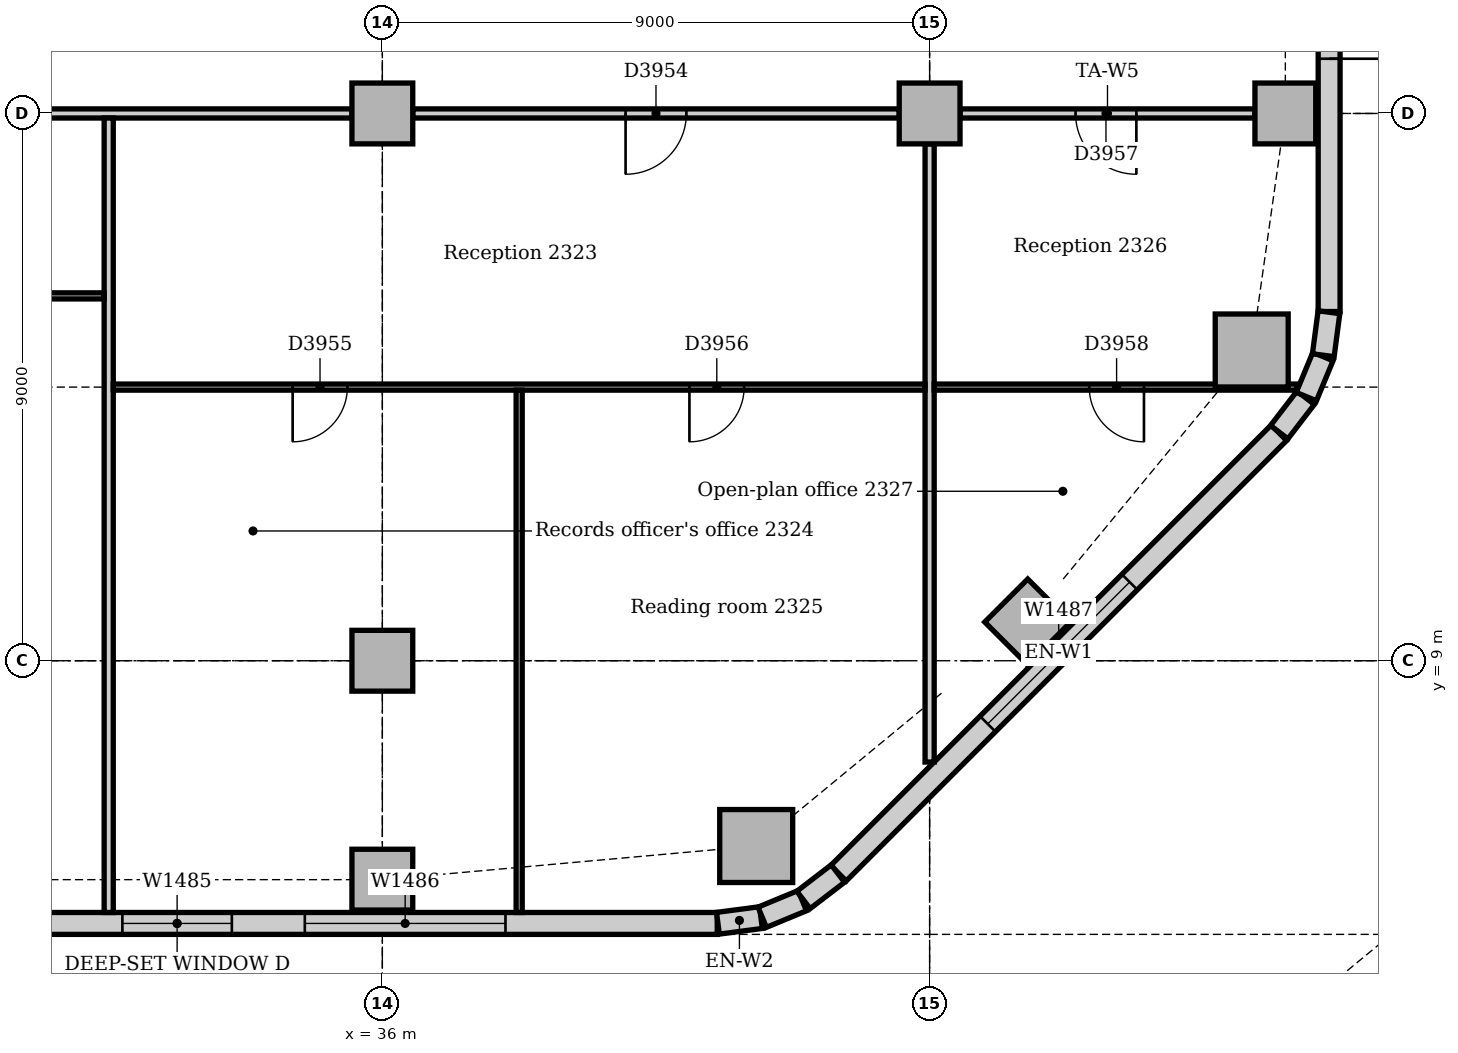
"""IFC4 building model, lengths in metres.
Left out: names, types, materials, properties, quantities, classifications, styles, units other than length and angle.
Written with IfcOpenShell. Run it as: python <this file> out.ifc"""

import sys

from ifc_helpers import new_model, si_unit, direction, frame, frame_2d, origin, origin_2d, place, context, subcontext, project, spatial, rectangle, extrude, element, fill, save


model = new_model("IFC4")
c1 = context("Model", 3, precision=1e-05, world=origin(), true_north=direction((0.0, 1.0)))
c2 = subcontext(c1, "Body", "Model", "MODEL_VIEW")
j1 = project(units=[si_unit("LENGTHUNIT", "METRE"), si_unit("PLANEANGLEUNIT", "RADIAN")], contexts=[c1])
p1 = place(None, origin())
s1 = spatial("IfcSite", under=j1, at=p1, CompositionType="ELEMENT")
p2 = place(p1, origin())
s2 = spatial("IfcBuilding", under=s1, at=p2, CompositionType="ELEMENT")
p3 = place(p2, frame((0.0, 0.0, 100.0)))
s3 = spatial("IfcBuildingStorey", under=s2, at=p3, CompositionType="ELEMENT", Elevation=100.0)
for number, where, z_axis, x_axis in (
    (1, (42.148, 5.953, -0.15), (0.0, 0.0, 1.0), (1.0, 0.0, 0.0)),
    (2, (50.297, 14.102, -0.15), (0.0, 0.0, 1.0), (1.0, 0.0, 0.0)),
):
    element("IfcColumn", number, at=place(p3, frame(where, z_axis=z_axis, x_axis=x_axis)), inside=s3, PredefinedType="COLUMN", context=c2, shape_type="SweptSolid", body=[
        extrude(rectangle(XDim=1.2, YDim=1.2, at=origin_2d()), origin(), (0.0, 0.0, 1.0), 4.0),
    ])
for number, where, z_axis, x_axis in (
    (3, (36.0, 5.4, -0.15), (0.0, 0.0, 1.0), (1.0, 0.0, 0.0)),
    (4, (46.614, 9.636, -0.15), (0.0, 0.0, 1.0), (0.707, 0.707, 0.0)),
    (5, (50.85, 18.0, -0.15), (0.0, 0.0, 1.0), (1.0, 0.0, 0.0)),
):
    element("IfcColumn", number, at=place(p3, frame(where, z_axis=z_axis, x_axis=x_axis)), inside=s3, PredefinedType="COLUMN", context=c2, shape_type="SweptSolid", body=[
        extrude(rectangle(XDim=1.0, YDim=1.0, at=origin_2d()), origin(), (0.0, 0.0, 1.0), 4.0),
    ])
for number, where, z_axis, x_axis in (
    (6, (36.0, 9.0, 0.0), (0.0, 0.0, 1.0), (1.0, 0.0, 0.0)),
    (7, (36.0, 18.0, 0.0), (0.0, 0.0, 1.0), (1.0, 0.0, 0.0)),
    (8, (45.0, 18.0, 0.0), (0.0, 0.0, 1.0), (1.0, 0.0, 0.0)),
):
    element("IfcColumn", number, at=place(p3, frame(where, z_axis=z_axis, x_axis=x_axis)), inside=s3, PredefinedType="COLUMN", context=c2, shape_type="SweptSolid", body=[
        extrude(rectangle(XDim=1.0, YDim=1.0, at=origin_2d()), origin(), (0.0, 0.0, 1.0), 3.85),
    ])
p4 = place(p3, frame((4.243, 4.68, 0.0), z_axis=(0.0, 0.0, 1.0), x_axis=(1.0, 0.0, 0.0)))
e9 = element("IfcWall", 9, at=p4, inside=s3, PredefinedType="STANDARD", context=c2, shape_type="SweptSolid", body=[
    extrude(rectangle(XDim=37.265, YDim=0.36, at=frame_2d((18.632, 0.0))), origin(), (0.0, 0.0, 1.0), 3.85),
])
p5 = place(p4, frame((3.482, 0.0, 0.9)))
e10 = element("IfcOpeningElement", 10, at=p5, cuts=e9, PredefinedType="OPENING", context=c2, shape_type="SweptSolid", body=[
    extrude(rectangle(XDim=3.3, YDim=1.6, at=frame_2d((1.65, 0.8))), frame((0.0, 0.19, 0.0), z_axis=(0.0, -1.0, 0.0), x_axis=(1.0, 0.0, 0.0)), (0.0, 0.0, 1.0), 0.38),
])
p6 = place(p4, frame((8.732, 0.0, 0.0)))
e11 = element("IfcOpeningElement", 11, at=p6, cuts=e9, PredefinedType="OPENING", context=c2, shape_type="SweptSolid", body=[
    extrude(rectangle(XDim=1.8, YDim=2.4, at=frame_2d((0.9, 1.2))), frame((0.0, 0.19, 0.0), z_axis=(0.0, -1.0, 0.0), x_axis=(1.0, 0.0, 0.0)), (0.0, 0.0, 1.0), 0.38),
])
p7 = place(p4, frame((12.482, 0.0, 0.9)))
e12 = element("IfcOpeningElement", 12, at=p7, cuts=e9, PredefinedType="OPENING", context=c2, shape_type="SweptSolid", body=[
    extrude(rectangle(XDim=3.3, YDim=1.6, at=frame_2d((1.65, 0.8))), frame((0.0, 0.19, 0.0), z_axis=(0.0, -1.0, 0.0), x_axis=(1.0, 0.0, 0.0)), (0.0, 0.0, 1.0), 0.38),
])
p8 = place(p4, frame((16.982, 0.0, 0.9)))
e13 = element("IfcOpeningElement", 13, at=p8, cuts=e9, PredefinedType="OPENING", context=c2, shape_type="SweptSolid", body=[
    extrude(rectangle(XDim=3.3, YDim=1.6, at=frame_2d((1.65, 0.8))), frame((0.0, 0.19, 0.0), z_axis=(0.0, -1.0, 0.0), x_axis=(1.0, 0.0, 0.0)), (0.0, 0.0, 1.0), 0.38),
])
p9 = place(p4, frame((21.482, 0.0, 0.9)))
e14 = element("IfcOpeningElement", 14, at=p9, cuts=e9, PredefinedType="OPENING", context=c2, shape_type="SweptSolid", body=[
    extrude(rectangle(XDim=3.3, YDim=1.6, at=frame_2d((1.65, 0.8))), frame((0.0, 0.19, 0.0), z_axis=(0.0, -1.0, 0.0), x_axis=(1.0, 0.0, 0.0)), (0.0, 0.0, 1.0), 0.38),
])
p10 = place(p4, frame((27.482, 0.0, 0.9)))
e15 = element("IfcOpeningElement", 15, at=p10, cuts=e9, PredefinedType="OPENING", context=c2, shape_type="SweptSolid", body=[
    extrude(rectangle(XDim=1.8, YDim=1.6, at=frame_2d((0.9, 0.8))), frame((0.0, 0.19, 0.0), z_axis=(0.0, -1.0, 0.0), x_axis=(1.0, 0.0, 0.0)), (0.0, 0.0, 1.0), 0.38),
])
p11 = place(p4, frame((30.482, 0.0, 0.9)))
e16 = element("IfcOpeningElement", 16, at=p11, cuts=e9, PredefinedType="OPENING", context=c2, shape_type="SweptSolid", body=[
    extrude(rectangle(XDim=3.3, YDim=1.6, at=frame_2d((1.65, 0.8))), frame((0.0, 0.19, 0.0), z_axis=(0.0, -1.0, 0.0), x_axis=(1.0, 0.0, 0.0)), (0.0, 0.0, 1.0), 0.38),
])
p12 = place(p3, frame((43.501, 5.506, 0.0), z_axis=(0.0, 0.0, 1.0), x_axis=(0.707106781187, 0.707106781187, 0.0)))
e17 = element("IfcWall", 17, at=p12, inside=s3, PredefinedType="STANDARD", context=c2, shape_type="SweptSolid", body=[
    extrude(rectangle(XDim=10.243, YDim=0.36, at=frame_2d((5.121, 0.0))), origin(), (0.0, 0.0, 1.0), 3.85),
])
p13 = place(p12, frame((3.471, 0.0, 0.9)))
e18 = element("IfcOpeningElement", 18, at=p13, cuts=e17, PredefinedType="OPENING", context=c2, shape_type="SweptSolid", body=[
    extrude(rectangle(XDim=3.3, YDim=1.6, at=frame_2d((1.65, 0.8))), frame((0.0, 0.19, 0.0), z_axis=(0.0, -1.0, 0.0), x_axis=(1.0, 0.0, 0.0)), (0.0, 0.0, 1.0), 0.38),
])
p14 = place(p3, frame((51.57, 14.743, 0.0), z_axis=(0.0, 0.0, 1.0), x_axis=(0.0, 1.0, 0.0)))
e19 = element("IfcWall", 19, at=p14, inside=s3, PredefinedType="STANDARD", context=c2, shape_type="SweptSolid", body=[
    extrude(rectangle(XDim=24.515, YDim=0.36, at=frame_2d((12.257, 0.0))), origin(), (0.0, 0.0, 1.0), 3.85),
])
p15 = place(p14, frame((4.157, 0.0, 0.0)))
e20 = element("IfcOpeningElement", 20, at=p15, cuts=e19, PredefinedType="OPENING", context=c2, shape_type="SweptSolid", body=[
    extrude(rectangle(XDim=1.8, YDim=2.4, at=frame_2d((0.9, 1.2))), frame((0.0, 0.19, 0.0), z_axis=(0.0, -1.0, 0.0), x_axis=(1.0, 0.0, 0.0)), (0.0, 0.0, 1.0), 0.38),
])
p16 = place(p14, frame((8.357, 0.0, 0.9)))
e21 = element("IfcOpeningElement", 21, at=p16, cuts=e19, PredefinedType="OPENING", context=c2, shape_type="SweptSolid", body=[
    extrude(rectangle(XDim=3.3, YDim=1.6, at=frame_2d((1.65, 0.8))), frame((0.0, 0.19, 0.0), z_axis=(0.0, -1.0, 0.0), x_axis=(1.0, 0.0, 0.0)), (0.0, 0.0, 1.0), 0.38),
])
p17 = place(p14, frame((12.857, 0.0, 0.9)))
e22 = element("IfcOpeningElement", 22, at=p17, cuts=e19, PredefinedType="OPENING", context=c2, shape_type="SweptSolid", body=[
    extrude(rectangle(XDim=3.3, YDim=1.6, at=frame_2d((1.65, 0.8))), frame((0.0, 0.19, 0.0), z_axis=(0.0, -1.0, 0.0), x_axis=(1.0, 0.0, 0.0)), (0.0, 0.0, 1.0), 0.38),
])
p18 = place(p14, frame((17.357, 0.0, 0.9)))
e23 = element("IfcOpeningElement", 23, at=p18, cuts=e19, PredefinedType="OPENING", context=c2, shape_type="SweptSolid", body=[
    extrude(rectangle(XDim=3.3, YDim=1.6, at=frame_2d((1.65, 0.8))), frame((0.0, 0.19, 0.0), z_axis=(0.0, -1.0, 0.0), x_axis=(1.0, 0.0, 0.0)), (0.0, 0.0, 1.0), 0.38),
])
for number, where, z_axis, x_axis in (
    (24, (41.519, 4.683, 0.0), (0.0, 0.0, 1.0), (0.991, 0.131, 0.0)),
    (25, (42.247, 4.782, 0.0), (0.0, 0.0, 1.0), (0.924, 0.383, 0.0)),
):
    element("IfcWall", number, at=place(p3, frame(where, z_axis=z_axis, x_axis=x_axis)), inside=s3, PredefinedType="STANDARD", context=c2, shape_type="SweptSolid", body=[
        extrude(rectangle(XDim=0.713, YDim=0.36, at=frame_2d((0.356, 0.0))), origin(), (0.0, 0.0, 1.0), 3.85),
    ])
for number, where, z_axis, x_axis in (
    (26, (42.925, 5.066, 0.0), (0.0, 0.0, 1.0), (0.793, 0.609, 0.0)),
    (27, (50.75, 12.759, 0.0), (0.0, 0.0, 1.0), (0.609, 0.793, 0.0)),
):
    element("IfcWall", number, at=place(p3, frame(where, z_axis=z_axis, x_axis=x_axis)), inside=s3, PredefinedType="STANDARD", context=c2, shape_type="SweptSolid", body=[
        extrude(rectangle(XDim=0.713, YDim=0.36, at=frame_2d((0.357, 0.0))), origin(), (0.0, 0.0, 1.0), 3.85),
    ])
for number, where, z_axis, x_axis in (
    (28, (51.195, 13.344, 0.0), (0.0, 0.0, 1.0), (0.383, 0.924, 0.0)),
    (29, (51.474, 14.024, 0.0), (0.0, 0.0, 1.0), (0.131, 0.991, 0.0)),
):
    element("IfcWall", number, at=place(p3, frame(where, z_axis=z_axis, x_axis=x_axis)), inside=s3, PredefinedType="STANDARD", context=c2, shape_type="SweptSolid", body=[
        extrude(rectangle(XDim=0.713, YDim=0.36, at=frame_2d((0.356, 0.0))), origin(), (0.0, 0.0, 1.0), 3.85),
    ])
p19 = place(p3, frame((45.5, 18.0, 0.0), z_axis=(0.0, 0.0, 1.0), x_axis=(1.0, 0.0, 0.0)))
e30 = element("IfcWall", 30, at=p19, inside=s3, PredefinedType="PARTITIONING", context=c2, shape_type="SweptSolid", body=[
    extrude(rectangle(XDim=4.85, YDim=0.15, at=frame_2d((2.425, 0.0))), origin(), (0.0, 0.0, 1.0), 3.254),
])
p20 = place(p19, frame((1.9, 0.0, 0.0)))
e31 = element("IfcOpeningElement", 31, at=p20, cuts=e30, PredefinedType="OPENING", context=c2, shape_type="SweptSolid", body=[
    extrude(rectangle(XDim=1.0, YDim=2.1, at=frame_2d((0.5, 1.05))), frame((0.0, 0.085, 0.0), z_axis=(0.0, -1.0, 0.0), x_axis=(1.0, 0.0, 0.0)), (0.0, 0.0, 1.0), 0.17),
])
p21 = place(p3, frame((36.5, 18.0, 0.0), z_axis=(0.0, 0.0, 1.0), x_axis=(1.0, 0.0, 0.0)))
e32 = element("IfcWall", 32, at=p21, inside=s3, PredefinedType="PARTITIONING", context=c2, shape_type="SweptSolid", body=[
    extrude(rectangle(XDim=8.0, YDim=0.15, at=frame_2d((4.0, 0.0))), origin(), (0.0, 0.0, 1.0), 3.158),
])
p22 = place(p21, frame((3.5, 0.0, 0.0)))
e33 = element("IfcOpeningElement", 33, at=p22, cuts=e32, PredefinedType="OPENING", context=c2, shape_type="SweptSolid", body=[
    extrude(rectangle(XDim=1.0, YDim=2.1, at=frame_2d((0.5, 1.05))), frame((0.0, 0.085, 0.0), z_axis=(0.0, -1.0, 0.0), x_axis=(1.0, 0.0, 0.0)), (0.0, 0.0, 1.0), 0.17),
])
p23 = place(p3, frame((27.5, 18.0, 0.0), z_axis=(0.0, 0.0, 1.0), x_axis=(1.0, 0.0, 0.0)))
e34 = element("IfcWall", 34, at=p23, inside=s3, PredefinedType="PARTITIONING", context=c2, shape_type="SweptSolid", body=[
    extrude(rectangle(XDim=8.0, YDim=0.15, at=frame_2d((4.0, 0.0))), origin(), (0.0, 0.0, 1.0), 3.158),
])
p24 = place(p3, frame((31.5, 4.86, 0.0), z_axis=(0.0, 0.0, 1.0), x_axis=(0.0, 1.0, 0.0)))
e35 = element("IfcWall", 35, at=p24, inside=s3, PredefinedType="PARTITIONING", context=c2, shape_type="SweptSolid", body=[
    extrude(rectangle(XDim=13.065, YDim=0.15, at=frame_2d((6.532, 0.0))), origin(), (0.0, 0.0, 1.0), 3.85),
])
p25 = place(p3, frame((45.0, 7.334, 0.0), z_axis=(0.0, 0.0, 1.0), x_axis=(0.0, 1.0, 0.0)))
e36 = element("IfcWall", 36, at=p25, inside=s3, PredefinedType="PARTITIONING", context=c2, shape_type="SweptSolid", body=[
    extrude(rectangle(XDim=10.166, YDim=0.15, at=frame_2d((5.083, 0.0))), origin(), (0.0, 0.0, 1.0), 3.256),
])
p26 = place(p3, frame((31.575, 13.5, 0.0), z_axis=(0.0, 0.0, 1.0), x_axis=(1.0, 0.0, 0.0)))
e37 = element("IfcWall", 37, at=p26, inside=s3, PredefinedType="PARTITIONING", context=c2, shape_type="SweptSolid", body=[
    extrude(rectangle(XDim=13.35, YDim=0.1, at=frame_2d((6.675, 0.0))), origin(), (0.0, 0.0, 1.0), 3.354),
])
p27 = place(p26, frame((2.95, 0.0, 0.0)))
e38 = element("IfcOpeningElement", 38, at=p27, cuts=e37, PredefinedType="OPENING", context=c2, shape_type="SweptSolid", body=[
    extrude(rectangle(XDim=0.9, YDim=2.1, at=frame_2d((0.45, 1.05))), frame((0.0, 0.06, 0.0), z_axis=(0.0, -1.0, 0.0), x_axis=(1.0, 0.0, 0.0)), (0.0, 0.0, 1.0), 0.12),
])
p28 = place(p26, frame((9.475, 0.0, 0.0)))
e39 = element("IfcOpeningElement", 39, at=p28, cuts=e37, PredefinedType="OPENING", context=c2, shape_type="SweptSolid", body=[
    extrude(rectangle(XDim=0.9, YDim=2.1, at=frame_2d((0.45, 1.05))), frame((0.0, 0.06, 0.0), z_axis=(0.0, -1.0, 0.0), x_axis=(1.0, 0.0, 0.0)), (0.0, 0.0, 1.0), 0.12),
])
p29 = place(p3, frame((45.075, 13.5, 0.0), z_axis=(0.0, 0.0, 1.0), x_axis=(1.0, 0.0, 0.0)))
e40 = element("IfcWall", 40, at=p29, inside=s3, PredefinedType="PARTITIONING", context=c2, shape_type="SweptSolid", body=[
    extrude(rectangle(XDim=5.969, YDim=0.1, at=frame_2d((2.985, 0.0))), origin(), (0.0, 0.0, 1.0), 3.454),
])
p30 = place(p29, frame((2.55, 0.0, 0.0)))
e41 = element("IfcOpeningElement", 41, at=p30, cuts=e40, PredefinedType="OPENING", context=c2, shape_type="SweptSolid", body=[
    extrude(rectangle(XDim=0.9, YDim=2.1, at=frame_2d((0.45, 1.05))), frame((0.0, 0.06, 0.0), z_axis=(0.0, -1.0, 0.0), x_axis=(1.0, 0.0, 0.0)), (0.0, 0.0, 1.0), 0.12),
])
p31 = place(p3, frame((18.075, 15.0, 0.0), z_axis=(0.0, 0.0, 1.0), x_axis=(1.0, 0.0, 0.0)))
e42 = element("IfcWall", 42, at=p31, inside=s3, PredefinedType="PARTITIONING", context=c2, shape_type="SweptSolid", body=[
    extrude(rectangle(XDim=13.35, YDim=0.1, at=frame_2d((6.675, 0.0))), origin(), (0.0, 0.0, 1.0), 3.85),
])
p32 = place(p31, frame((6.2, 0.0, 0.0)))
e43 = element("IfcOpeningElement", 43, at=p32, cuts=e42, PredefinedType="OPENING", context=c2, shape_type="SweptSolid", body=[
    extrude(rectangle(XDim=0.9, YDim=2.1, at=frame_2d((0.45, 1.05))), frame((0.0, 0.06, 0.0), z_axis=(0.0, -1.0, 0.0), x_axis=(1.0, 0.0, 0.0)), (0.0, 0.0, 1.0), 0.12),
])
p33 = place(p3, frame((38.25, 4.86, 0.0), z_axis=(0.0, 0.0, 1.0), x_axis=(0.0, 1.0, 0.0)))
e44 = element("IfcWall", 44, at=p33, inside=s3, PredefinedType="PARTITIONING", context=c2, shape_type="SweptSolid", body=[
    extrude(rectangle(XDim=8.59, YDim=0.1, at=frame_2d((4.295, 0.0))), origin(), (0.0, 0.0, 1.0), 3.85),
])
p34 = place(p10, origin())
e45 = element("IfcWindow", 45, at=p34, inside=s3, PartitioningType="SINGLE_PANEL", PredefinedType="WINDOW", context=c2, shape_type="SweptSolid", body=[
    extrude(rectangle(XDim=1.8, YDim=1.6, at=frame_2d((0.9, 0.8))), frame((0.0, 0.13, 0.0), z_axis=(0.0, -1.0, 0.0), x_axis=(1.0, 0.0, 0.0)), (0.0, 0.0, 1.0), 0.06),
])
fill(e15, e45)
p35 = place(p11, origin())
e46 = element("IfcWindow", 46, at=p35, inside=s3, PartitioningType="SINGLE_PANEL", PredefinedType="WINDOW", context=c2, shape_type="SweptSolid", body=[
    extrude(rectangle(XDim=3.3, YDim=1.6, at=frame_2d((1.65, 0.8))), frame((0.0, 0.13, 0.0), z_axis=(0.0, -1.0, 0.0), x_axis=(1.0, 0.0, 0.0)), (0.0, 0.0, 1.0), 0.06),
])
fill(e16, e46)
p36 = place(p13, origin())
e47 = element("IfcWindow", 47, at=p36, inside=s3, PartitioningType="SINGLE_PANEL", PredefinedType="WINDOW", context=c2, shape_type="SweptSolid", body=[
    extrude(rectangle(XDim=3.3, YDim=1.6, at=frame_2d((1.65, 0.8))), frame((0.0, 0.13, 0.0), z_axis=(0.0, -1.0, 0.0), x_axis=(1.0, 0.0, 0.0)), (0.0, 0.0, 1.0), 0.06),
])
fill(e18, e47)
p37 = place(p15, frame((1.8, 0.0, 0.0), z_axis=(0.0, 0.0, 1.0), x_axis=(-1.0, 0.0, 0.0)))
e48 = element("IfcDoor", 48, at=p37, inside=s3, OperationType="DOUBLE_DOOR_SINGLE_SWING", PredefinedType="DOOR", context=c2, shape_type="SweptSolid", body=[
    extrude(rectangle(XDim=1.8, YDim=2.4, at=frame_2d((0.9, 1.2))), frame((0.0, -0.07, 0.0), z_axis=(0.0, -1.0, 0.0), x_axis=(1.0, 0.0, 0.0)), (0.0, 0.0, 1.0), 0.05),
])
fill(e20, e48)
p38 = place(p22, frame((1.0, 0.0, 0.0), z_axis=(0.0, 0.0, 1.0), x_axis=(-1.0, 0.0, 0.0)))
e49 = element("IfcDoor", 49, at=p38, inside=s3, OperationType="SINGLE_SWING_RIGHT", PredefinedType="DOOR", context=c2, shape_type="SweptSolid", body=[
    extrude(rectangle(XDim=1.0, YDim=2.1, at=frame_2d((0.5, 1.05))), frame((0.0, 0.025, 0.0), z_axis=(0.0, -1.0, 0.0), x_axis=(1.0, 0.0, 0.0)), (0.0, 0.0, 1.0), 0.05),
])
fill(e33, e49)
p39 = place(p27, frame((0.9, 0.0, 0.0), z_axis=(0.0, 0.0, 1.0), x_axis=(-1.0, 0.0, 0.0)))
e50 = element("IfcDoor", 50, at=p39, inside=s3, OperationType="SINGLE_SWING_RIGHT", PredefinedType="DOOR", context=c2, shape_type="SweptSolid", body=[
    extrude(rectangle(XDim=0.9, YDim=2.1, at=frame_2d((0.45, 1.05))), frame((0.0, 0.025, 0.0), z_axis=(0.0, -1.0, 0.0), x_axis=(1.0, 0.0, 0.0)), (0.0, 0.0, 1.0), 0.05),
])
fill(e38, e50)
p40 = place(p28, frame((0.9, 0.0, 0.0), z_axis=(0.0, 0.0, 1.0), x_axis=(-1.0, 0.0, 0.0)))
e51 = element("IfcDoor", 51, at=p40, inside=s3, OperationType="SINGLE_SWING_RIGHT", PredefinedType="DOOR", context=c2, shape_type="SweptSolid", body=[
    extrude(rectangle(XDim=0.9, YDim=2.1, at=frame_2d((0.45, 1.05))), frame((0.0, 0.025, 0.0), z_axis=(0.0, -1.0, 0.0), x_axis=(1.0, 0.0, 0.0)), (0.0, 0.0, 1.0), 0.05),
])
fill(e39, e51)
p41 = place(p20, frame((1.0, 0.0, 0.0), z_axis=(0.0, 0.0, 1.0), x_axis=(-1.0, 0.0, 0.0)))
e52 = element("IfcDoor", 52, at=p41, inside=s3, OperationType="SINGLE_SWING_LEFT", PredefinedType="DOOR", context=c2, shape_type="SweptSolid", body=[
    extrude(rectangle(XDim=1.0, YDim=2.1, at=frame_2d((0.5, 1.05))), frame((0.0, 0.025, 0.0), z_axis=(0.0, -1.0, 0.0), x_axis=(1.0, 0.0, 0.0)), (0.0, 0.0, 1.0), 0.05),
])
fill(e31, e52)
p42 = place(p30, frame((0.9, 0.0, 0.0), z_axis=(0.0, 0.0, 1.0), x_axis=(-1.0, 0.0, 0.0)))
e53 = element("IfcDoor", 53, at=p42, inside=s3, OperationType="SINGLE_SWING_LEFT", PredefinedType="DOOR", context=c2, shape_type="SweptSolid", body=[
    extrude(rectangle(XDim=0.9, YDim=2.1, at=frame_2d((0.45, 1.05))), frame((0.0, 0.025, 0.0), z_axis=(0.0, -1.0, 0.0), x_axis=(1.0, 0.0, 0.0)), (0.0, 0.0, 1.0), 0.05),
])
fill(e41, e53)
save(model, sys.argv[1])
